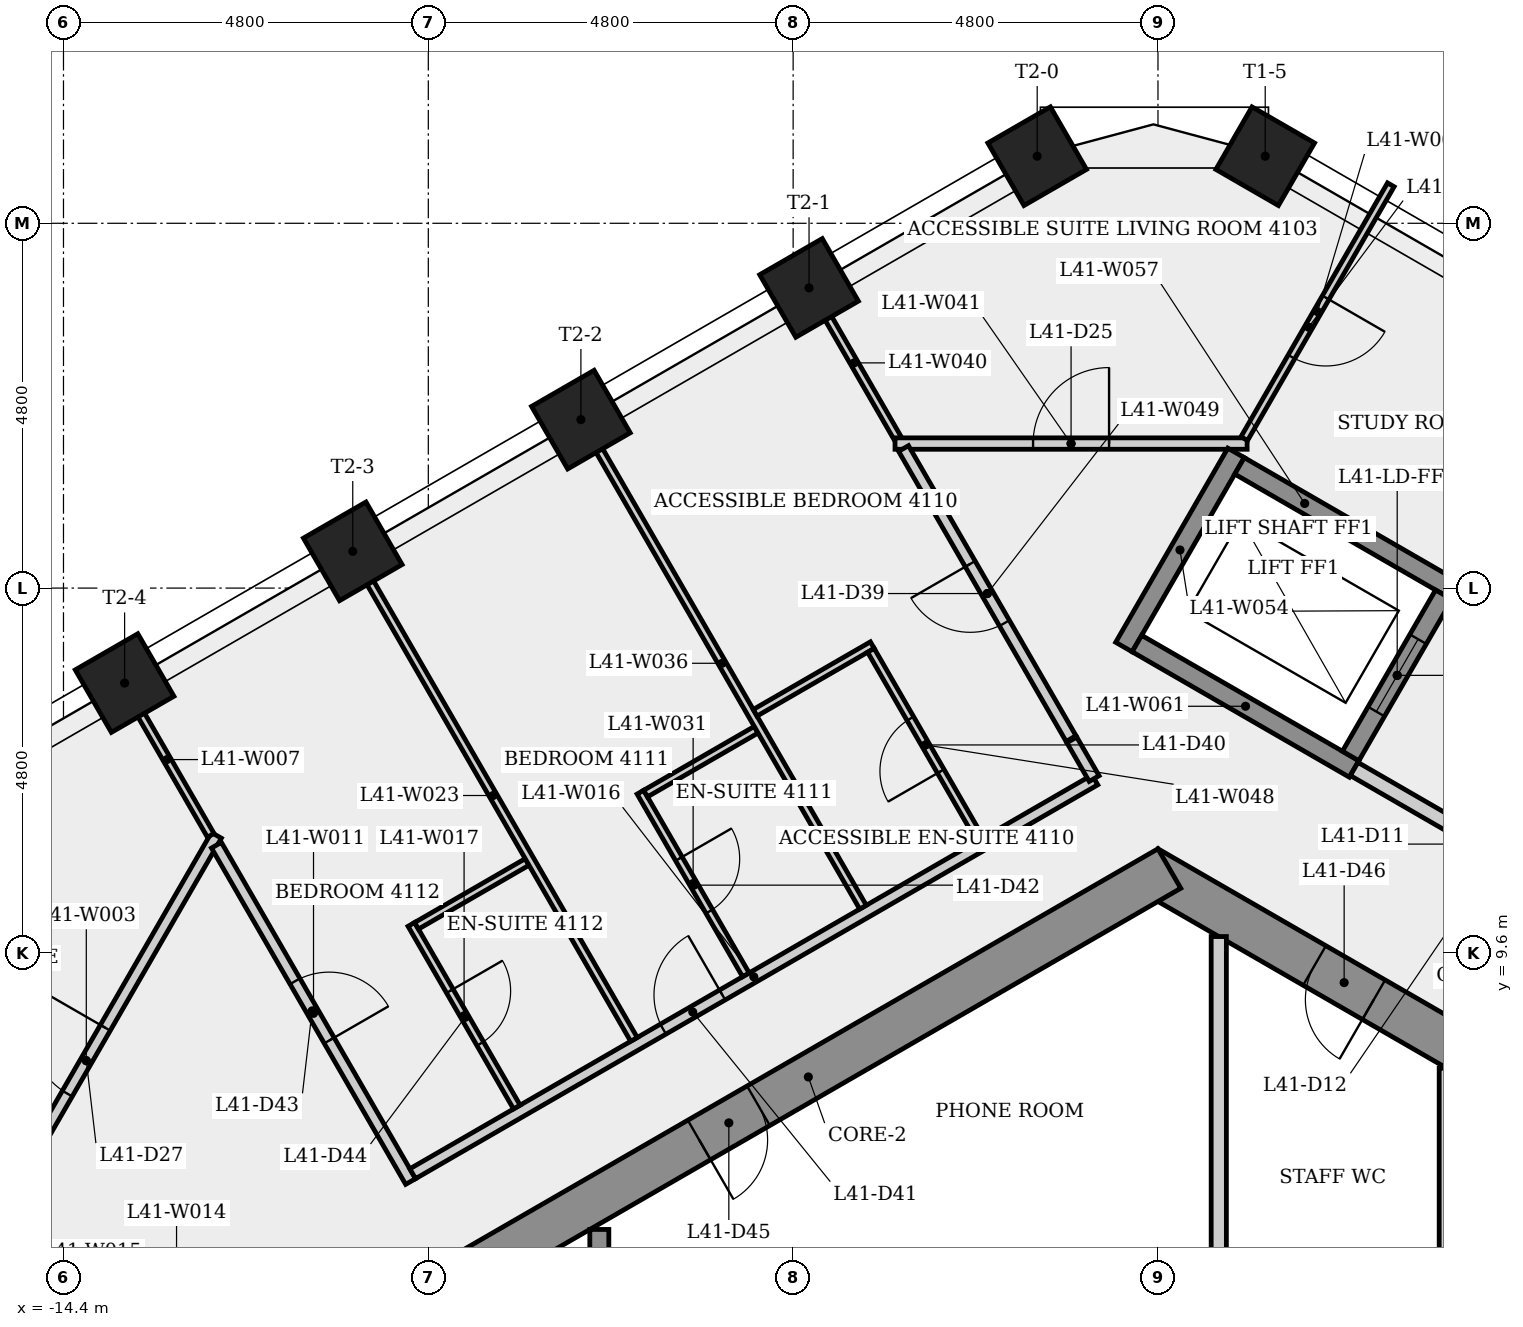
"""IFC4 building model, lengths in metres.
Left out: names, types, materials, properties, quantities, classifications, styles, units other than length and angle.
Written with IfcOpenShell. Run it as: python <this file> out.ifc"""

import sys

from ifc_helpers import new_model, si_unit, direction, frame, frame_2d, origin, origin_2d, place, context, subcontext, project, spatial, rectangle, extrude, element, fill, save


model = new_model("IFC4")
c1 = context("Model", 3, precision=1e-05, world=origin(), true_north=direction((0.0, 1.0)))
c2 = subcontext(c1, "Body", "Model", "MODEL_VIEW")
j1 = project(units=[si_unit("LENGTHUNIT", "METRE"), si_unit("PLANEANGLEUNIT", "RADIAN")], contexts=[c1])
p1 = place(None, origin())
s1 = spatial("IfcSite", under=j1, at=p1, CompositionType="ELEMENT")
p2 = place(p1, origin())
s2 = spatial("IfcBuilding", under=s1, at=p2, CompositionType="ELEMENT")
p3 = place(p2, frame((0.0, 0.0, 156.1)))
s3 = spatial("IfcBuildingStorey", under=s2, at=p3, CompositionType="ELEMENT", Elevation=156.1)
p4 = place(p3, frame((9.35, 5.225, 0.0), z_axis=(0.0, 0.0, 1.0), x_axis=(-0.866023993627, 0.500002442456, 0.0)))
e1 = element("IfcWall", 1, at=p4, inside=s3, PredefinedType="SHEAR", context=c2, shape_type="SweptSolid", body=[
    extrude(rectangle(XDim=10.97, YDim=0.6, at=frame_2d((5.485, 0.0))), origin(), (0.0, 0.0, 1.0), 3.4),
])
p5 = place(p4, frame((7.518, 0.0, 0.0)))
e2 = element("IfcOpeningElement", 2, at=p5, cuts=e1, PredefinedType="OPENING", context=c2, shape_type="SweptSolid", body=[
    extrude(rectangle(XDim=0.9, YDim=2.1, at=frame_2d((0.45, 1.05))), frame((0.0, 0.31, 0.0), z_axis=(0.0, -1.0, 0.0), x_axis=(1.0, 0.0, 0.0)), (0.0, 0.0, 1.0), 0.62),
])
p6 = place(p4, frame((1.172, 0.0, 0.0)))
e3 = element("IfcOpeningElement", 3, at=p6, cuts=e1, PredefinedType="OPENING", context=c2, shape_type="SweptSolid", body=[
    extrude(rectangle(XDim=0.9, YDim=2.1, at=frame_2d((0.45, 1.05))), frame((0.0, 0.31, 0.0), z_axis=(0.0, -1.0, 0.0), x_axis=(1.0, 0.0, 0.0)), (0.0, 0.0, 1.0), 0.62),
])
p7 = place(p3, frame((0.15, 10.71, 0.0), z_axis=(0.0, 0.0, 1.0), x_axis=(-0.866023993627, -0.500002442456, 0.0)))
e4 = element("IfcWall", 4, at=p7, inside=s3, PredefinedType="SHEAR", context=c2, shape_type="SweptSolid", body=[
    extrude(rectangle(XDim=10.97, YDim=0.6, at=frame_2d((5.485, 0.0))), origin(), (0.0, 0.0, 1.0), 3.4),
])
p8 = place(p7, frame((6.243, 0.0, 0.0)))
e5 = element("IfcOpeningElement", 5, at=p8, cuts=e4, PredefinedType="OPENING", context=c2, shape_type="SweptSolid", body=[
    extrude(rectangle(XDim=0.9, YDim=2.1, at=frame_2d((0.45, 1.05))), frame((0.0, 0.31, 0.0), z_axis=(0.0, -1.0, 0.0), x_axis=(1.0, 0.0, 0.0)), (0.0, 0.0, 1.0), 0.62),
])
for number, where, z_axis, x_axis in (
    (6, (1.411, 20.083, 0.0), (0.0, 0.0, 1.0), (0.5, 0.866, 0.0)),
    (7, (-1.589, 20.083, 0.0), (0.0, 0.0, 1.0), (-0.5, 0.866, 0.0)),
    (8, (-4.591, 18.35, 0.0), (0.0, 0.0, 1.0), (-0.5, 0.866, 0.0)),
    (9, (-7.593, 16.616, 0.0), (0.0, 0.0, 1.0), (-0.5, 0.866, 0.0)),
    (10, (-10.594, 14.884, 0.0), (0.0, 0.0, 1.0), (-0.5, 0.866, 0.0)),
    (11, (-13.596, 13.15, 0.0), (0.0, 0.0, 1.0), (-0.5, 0.866, 0.0)),
):
    element("IfcColumn", number, at=place(p3, frame(where, z_axis=z_axis, x_axis=x_axis)), inside=s3, PredefinedType="COLUMN", context=c2, shape_type="SweptSolid", body=[
        extrude(rectangle(XDim=0.95, YDim=0.95, at=origin_2d()), origin(), (0.0, 0.0, 1.0), 3.4),
    ])
p9 = place(p3, frame((-15.812, 5.216, 0.0), z_axis=(0.0, 0.0, 1.0), x_axis=(0.50000019414, 0.866025291697, 0.0)))
e12 = element("IfcWall", 12, at=p9, inside=s3, PredefinedType="PARTITIONING", context=c2, shape_type="SweptSolid", body=[
    extrude(rectangle(XDim=6.848, YDim=0.15, at=frame_2d((3.424, 0.0))), origin(), (0.0, 0.0, 1.0), 3.05),
])
p10 = place(p9, frame((2.924, 0.0, 0.0)))
e13 = element("IfcOpeningElement", 13, at=p10, cuts=e12, PredefinedType="OPENING", context=c2, shape_type="SweptSolid", body=[
    extrude(rectangle(XDim=1.0, YDim=2.1, at=frame_2d((0.5, 1.05))), frame((0.0, 0.085, 0.0), z_axis=(0.0, -1.0, 0.0), x_axis=(1.0, 0.0, 0.0)), (0.0, 0.0, 1.0), 0.17),
])
p11 = place(p3, frame((-13.614, 13.14, 0.0), z_axis=(0.0, 0.0, 1.0), x_axis=(0.49996120575, -0.866047800497, 0.0)))
e14 = element("IfcWall", 14, at=p11, inside=s3, PredefinedType="PARTITIONING", context=c2, shape_type="SweptSolid", body=[
    extrude(rectangle(XDim=2.302, YDim=0.1, at=frame_2d((1.151, 0.0))), origin(), (0.0, 0.0, 1.0), 3.05),
])
p12 = place(p3, frame((-12.388, 11.017, 0.0), z_axis=(0.0, 0.0, 1.0), x_axis=(0.499962338254, -0.866047146712, 0.0)))
e15 = element("IfcWall", 15, at=p12, inside=s3, PredefinedType="PARTITIONING", context=c2, shape_type="SweptSolid", body=[
    extrude(rectangle(XDim=5.11, YDim=0.15, at=frame_2d((2.555, 0.0))), origin(), (0.0, 0.0, 1.0), 3.05),
])
p13 = place(p12, frame((2.067, 0.0, 0.0)))
e16 = element("IfcOpeningElement", 16, at=p13, cuts=e15, PredefinedType="OPENING", context=c2, shape_type="SweptSolid", body=[
    extrude(rectangle(XDim=0.9, YDim=2.1, at=frame_2d((0.45, 1.05))), frame((0.0, 0.085, 0.0), z_axis=(0.0, -1.0, 0.0), x_axis=(1.0, 0.0, 0.0)), (0.0, 0.0, 1.0), 0.17),
])
p14 = place(p3, frame((-9.805, 6.694, 0.0), z_axis=(0.0, 0.0, 1.0), x_axis=(0.866028286753, 0.499995006518, 0.0)))
e17 = element("IfcWall", 17, at=p14, inside=s3, PredefinedType="PARTITIONING", context=c2, shape_type="SweptSolid", body=[
    extrude(rectangle(XDim=10.364, YDim=0.15, at=frame_2d((5.182, 0.0))), origin(), (0.0, 0.0, 1.0), 3.05),
])
p15 = place(p14, frame((3.805, 0.0, 0.0)))
e18 = element("IfcOpeningElement", 18, at=p15, cuts=e17, PredefinedType="OPENING", context=c2, shape_type="SweptSolid", body=[
    extrude(rectangle(XDim=0.9, YDim=2.1, at=frame_2d((0.45, 1.05))), frame((0.0, 0.085, 0.0), z_axis=(0.0, -1.0, 0.0), x_axis=(1.0, 0.0, 0.0)), (0.0, 0.0, 1.0), 0.17),
])
p16 = place(p3, frame((-9.823, 9.975, 0.0), z_axis=(0.0, 0.0, 1.0), x_axis=(0.499971228071, -0.866042014628, 0.0)))
e19 = element("IfcWall", 19, at=p16, inside=s3, PredefinedType="PARTITIONING", context=c2, shape_type="SweptSolid", body=[
    extrude(rectangle(XDim=2.775, YDim=0.1, at=frame_2d((1.388, 0.0))), origin(), (0.0, 0.0, 1.0), 3.05),
])
p17 = place(p16, frame((1.012, 0.0, 0.0)))
e20 = element("IfcOpeningElement", 20, at=p17, cuts=e19, PredefinedType="OPENING", context=c2, shape_type="SweptSolid", body=[
    extrude(rectangle(XDim=0.8, YDim=2.1, at=frame_2d((0.4, 1.05))), frame((0.0, 0.06, 0.0), z_axis=(0.0, -1.0, 0.0), x_axis=(1.0, 0.0, 0.0)), (0.0, 0.0, 1.0), 0.12),
])
p18 = place(p3, frame((-8.3, 10.796, 0.0), z_axis=(0.0, 0.0, 1.0), x_axis=(-0.866052479261, -0.499953100966, 0.0)))
e21 = element("IfcWall", 21, at=p18, inside=s3, PredefinedType="PARTITIONING", context=c2, shape_type="SweptSolid", body=[
    extrude(rectangle(XDim=1.68, YDim=0.1, at=frame_2d((0.84, 0.0))), origin(), (0.0, 0.0, 1.0), 3.05),
])
p19 = place(p3, frame((-10.6, 14.88, 0.0), z_axis=(0.0, 0.0, 1.0), x_axis=(0.499997136009, -0.866027057304, 0.0)))
e22 = element("IfcWall", 22, at=p19, inside=s3, PredefinedType="PARTITIONING", context=c2, shape_type="SweptSolid", body=[
    extrude(rectangle(XDim=7.412, YDim=0.1, at=frame_2d((3.706, 0.0))), origin(), (0.0, 0.0, 1.0), 3.05),
])
p20 = place(p3, frame((-7.35, 1.925, 0.0), z_axis=(0.0, 0.0, 1.0), x_axis=(0.0, 1.0, 0.0)))
e23 = element("IfcWall", 23, at=p20, inside=s3, PredefinedType="SHEAR", context=c2, shape_type="SweptSolid", body=[
    extrude(rectangle(XDim=4.036, YDim=0.25, at=frame_2d((2.018, 0.0))), origin(), (0.0, 0.0, 1.0), 3.05),
])
p21 = place(p3, frame((-6.81, 11.715, 0.0), z_axis=(0.0, 0.0, 1.0), x_axis=(0.50000932403, -0.866020020486, 0.0)))
e24 = element("IfcWall", 24, at=p21, inside=s3, PredefinedType="PARTITIONING", context=c2, shape_type="SweptSolid", body=[
    extrude(rectangle(XDim=2.775, YDim=0.1, at=frame_2d((1.387, 0.0))), origin(), (0.0, 0.0, 1.0), 3.05),
])
p22 = place(p21, frame((1.012, 0.0, 0.0)))
e25 = element("IfcOpeningElement", 25, at=p22, cuts=e24, PredefinedType="OPENING", context=c2, shape_type="SweptSolid", body=[
    extrude(rectangle(XDim=0.8, YDim=2.1, at=frame_2d((0.4, 1.05))), frame((0.0, 0.06, 0.0), z_axis=(0.0, -1.0, 0.0), x_axis=(1.0, 0.0, 0.0)), (0.0, 0.0, 1.0), 0.12),
])
p23 = place(p3, frame((-5.287, 12.536, 0.0), z_axis=(0.0, 0.0, 1.0), x_axis=(-0.865953201874, -0.50012503653, 0.0)))
e26 = element("IfcWall", 26, at=p23, inside=s3, PredefinedType="PARTITIONING", context=c2, shape_type="SweptSolid", body=[
    extrude(rectangle(XDim=1.68, YDim=0.1, at=frame_2d((0.84, 0.0))), origin(), (0.0, 0.0, 1.0), 3.05),
])
p24 = place(p3, frame((-7.586, 16.62, 0.0), z_axis=(0.0, 0.0, 1.0), x_axis=(0.500011399757, -0.866018822032, 0.0)))
e27 = element("IfcWall", 27, at=p24, inside=s3, PredefinedType="PARTITIONING", context=c2, shape_type="SweptSolid", body=[
    extrude(rectangle(XDim=7.411, YDim=0.1, at=frame_2d((3.706, 0.0))), origin(), (0.0, 0.0, 1.0), 3.05),
])
p25 = place(p3, frame((-3.759, 13.649, 0.0), z_axis=(0.0, 0.0, 1.0), x_axis=(-0.866014251095, -0.500019316528, 0.0)))
e28 = element("IfcWall", 28, at=p25, inside=s3, PredefinedType="PARTITIONING", context=c2, shape_type="SweptSolid", body=[
    extrude(rectangle(XDim=1.78, YDim=0.1, at=frame_2d((0.89, 0.0))), origin(), (0.0, 0.0, 1.0), 3.05),
])
p26 = place(p3, frame((-3.422, 16.367, 0.0), z_axis=(0.0, 0.0, 1.0), x_axis=(-0.500040764516, 0.866001867101, 0.0)))
e29 = element("IfcWall", 29, at=p26, inside=s3, PredefinedType="PARTITIONING", context=c2, shape_type="SweptSolid", body=[
    extrude(rectangle(XDim=2.302, YDim=0.1, at=frame_2d((1.151, 0.0))), origin(), (0.0, 0.0, 1.0), 3.05),
])
p27 = place(p3, frame((-3.46, 16.302, 0.0), z_axis=(0.0, 0.0, 1.0), x_axis=(1.0, 0.0, 0.0)))
e30 = element("IfcWall", 30, at=p27, inside=s3, PredefinedType="PARTITIONING", context=c2, shape_type="SweptSolid", body=[
    extrude(rectangle(XDim=4.633, YDim=0.15, at=frame_2d((2.316, 0.0))), origin(), (0.0, 0.0, 1.0), 3.05),
])
p28 = place(p27, frame((1.816, 0.0, 0.0)))
e31 = element("IfcOpeningElement", 31, at=p28, cuts=e30, PredefinedType="OPENING", context=c2, shape_type="SweptSolid", body=[
    extrude(rectangle(XDim=1.0, YDim=2.1, at=frame_2d((0.5, 1.05))), frame((0.0, 0.085, 0.0), z_axis=(0.0, -1.0, 0.0), x_axis=(1.0, 0.0, 0.0)), (0.0, 0.0, 1.0), 0.17),
])
p29 = place(p3, frame((-2.339, 11.091, 0.0), z_axis=(0.0, 0.0, 1.0), x_axis=(-0.500011588718, 0.866018712932, 0.0)))
e32 = element("IfcWall", 32, at=p29, inside=s3, PredefinedType="PARTITIONING", context=c2, shape_type="SweptSolid", body=[
    extrude(rectangle(XDim=2.875, YDim=0.1, at=frame_2d((1.438, 0.0))), origin(), (0.0, 0.0, 1.0), 3.05),
])
p30 = place(p29, frame((1.038, 0.0, 0.0)))
e33 = element("IfcOpeningElement", 33, at=p30, cuts=e32, PredefinedType="OPENING", context=c2, shape_type="SweptSolid", body=[
    extrude(rectangle(XDim=0.8, YDim=2.1, at=frame_2d((0.4, 1.05))), frame((0.0, 0.06, 0.0), z_axis=(0.0, -1.0, 0.0), x_axis=(1.0, 0.0, 0.0)), (0.0, 0.0, 1.0), 0.12),
])
p31 = place(p3, frame((-1.143, 12.42, 0.0), z_axis=(0.0, 0.0, 1.0), x_axis=(-0.500005339912, 0.866022320763, 0.0)))
e34 = element("IfcWall", 34, at=p31, inside=s3, PredefinedType="PARTITIONING", context=c2, shape_type="SweptSolid", body=[
    extrude(rectangle(XDim=4.408, YDim=0.15, at=frame_2d((2.204, 0.0))), origin(), (0.0, 0.0, 1.0), 3.05),
])
p32 = place(p31, frame((1.754, 0.0, 0.0)))
e35 = element("IfcOpeningElement", 35, at=p32, cuts=e34, PredefinedType="OPENING", context=c2, shape_type="SweptSolid", body=[
    extrude(rectangle(XDim=0.9, YDim=2.1, at=frame_2d((0.45, 1.05))), frame((0.0, 0.085, 0.0), z_axis=(0.0, -1.0, 0.0), x_axis=(1.0, 0.0, 0.0)), (0.0, 0.0, 1.0), 0.17),
])
p33 = place(p3, frame((-1.133, 12.402, 0.0), z_axis=(0.0, 0.0, 1.0), x_axis=(0.499938297808, -0.866061024631, 0.0)))
e36 = element("IfcWall", 36, at=p33, inside=s3, PredefinedType="PARTITIONING", context=c2, shape_type="SweptSolid", body=[
    extrude(rectangle(XDim=0.587, YDim=0.15, at=frame_2d((0.294, 0.0))), origin(), (0.0, 0.0, 1.0), 3.05),
])
p34 = place(p3, frame((-0.448, 13.624, 0.0), z_axis=(0.0, 0.0, 1.0), x_axis=(0.500037662692, 0.866003658127, 0.0)))
e37 = element("IfcWall", 37, at=p34, inside=s3, PredefinedType="SHEAR", context=c2, shape_type="SweptSolid", body=[
    extrude(rectangle(XDim=2.95, YDim=0.25, at=frame_2d((1.475, 0.0))), origin(), (0.0, 0.0, 1.0), 3.05),
])
p35 = place(p3, frame((0.8, 9.815, 0.0), z_axis=(0.0, 0.0, 1.0), x_axis=(0.0, -1.0, 0.0)))
e38 = element("IfcWall", 38, at=p35, inside=s3, PredefinedType="PARTITIONING", context=c2, shape_type="SweptSolid", body=[
    extrude(rectangle(XDim=4.54, YDim=0.2, at=frame_2d((2.27, 0.0))), origin(), (0.0, 0.0, 1.0), 3.05),
])
for number, where, z_axis, x_axis in (
    (39, (1.073, 16.008, 0.0), (0.0, 0.0, 1.0), (0.866, -0.5, 0.0)),
    (40, (2.581, 12.02, 0.0), (0.0, 0.0, 1.0), (-0.866, 0.5, 0.0)),
):
    element("IfcWall", number, at=place(p3, frame(where, z_axis=z_axis, x_axis=x_axis)), inside=s3, PredefinedType="SHEAR", context=c2, shape_type="SweptSolid", body=[
        extrude(rectangle(XDim=3.3, YDim=0.25, at=frame_2d((1.65, 0.0))), origin(), (0.0, 0.0, 1.0), 3.05),
    ])
p36 = place(p3, frame((2.535, 12.191, 0.0), z_axis=(0.0, 0.0, 1.0), x_axis=(0.500061746146, 0.865989751695, 0.0)))
e41 = element("IfcWall", 41, at=p36, inside=s3, PredefinedType="SHEAR", context=c2, shape_type="SweptSolid", body=[
    extrude(rectangle(XDim=2.45, YDim=0.25, at=frame_2d((1.225, 0.0))), origin(), (0.0, 0.0, 1.0), 3.4),
])
p37 = place(p36, frame((0.675, 0.0, 0.0)))
e42 = element("IfcOpeningElement", 42, at=p37, cuts=e41, PredefinedType="OPENING", context=c2, shape_type="SweptSolid", body=[
    extrude(rectangle(XDim=1.1, YDim=2.1, at=frame_2d((0.55, 1.05))), frame((0.0, 0.135, 0.0), z_axis=(0.0, -1.0, 0.0), x_axis=(1.0, 0.0, 0.0)), (0.0, 0.0, 1.0), 0.27),
])
p38 = place(p3, frame((3.064, 19.707, 0.0), z_axis=(0.0, 0.0, 1.0), x_axis=(-0.499992798144, -0.866029561738, 0.0)))
e43 = element("IfcWall", 43, at=p38, inside=s3, PredefinedType="PARTITIONING", context=c2, shape_type="SweptSolid", body=[
    extrude(rectangle(XDim=3.856, YDim=0.1, at=frame_2d((1.928, 0.0))), origin(), (0.0, 0.0, 1.0), 3.05),
])
p39 = place(p38, frame((1.714, 0.0, 0.0)))
e44 = element("IfcOpeningElement", 44, at=p39, cuts=e43, PredefinedType="OPENING", context=c2, shape_type="SweptSolid", body=[
    extrude(rectangle(XDim=0.9, YDim=2.1, at=frame_2d((0.45, 1.05))), frame((0.0, 0.06, 0.0), z_axis=(0.0, -1.0, 0.0), x_axis=(1.0, 0.0, 0.0)), (0.0, 0.0, 1.0), 0.12),
])
p40 = place(p3, frame((3.8, 8.083, 0.0), z_axis=(0.0, 0.0, 1.0), x_axis=(0.0, -1.0, 0.0)))
e45 = element("IfcWall", 45, at=p40, inside=s3, PredefinedType="PARTITIONING", context=c2, shape_type="SweptSolid", body=[
    extrude(rectangle(XDim=2.808, YDim=0.2, at=frame_2d((1.404, 0.0))), origin(), (0.0, 0.0, 1.0), 3.05),
])
p41 = place(p3, frame((6.435, 9.795, 0.0), z_axis=(0.0, 0.0, 1.0), x_axis=(-0.866012907634, 0.500021643343, 0.0)))
e46 = element("IfcWall", 46, at=p41, inside=s3, PredefinedType="PARTITIONING", context=c2, shape_type="SweptSolid", body=[
    extrude(rectangle(XDim=4.45, YDim=0.2, at=frame_2d((2.225, 0.0))), origin(), (0.0, 0.0, 1.0), 3.05),
])
p42 = place(p41, frame((1.675, 0.0, 0.0)))
e47 = element("IfcOpeningElement", 47, at=p42, cuts=e46, PredefinedType="OPENING", context=c2, shape_type="SweptSolid", body=[
    extrude(rectangle(XDim=1.1, YDim=2.1, at=frame_2d((0.55, 1.05))), frame((0.0, 0.11, 0.0), z_axis=(0.0, -1.0, 0.0), x_axis=(1.0, 0.0, 0.0)), (0.0, 0.0, 1.0), 0.22),
])
p43 = place(p37, origin())
e48 = element("IfcDoor", 48, at=p43, inside=s3, OperationType="SLIDING_TO_LEFT", PredefinedType="DOOR", context=c2, shape_type="SweptSolid", body=[
    extrude(rectangle(XDim=1.1, YDim=2.1, at=frame_2d((0.55, 1.05))), frame((0.0, 0.025, 0.0), z_axis=(0.0, -1.0, 0.0), x_axis=(1.0, 0.0, 0.0)), (0.0, 0.0, 1.0), 0.05),
])
fill(e42, e48)
p44 = place(p28, origin())
e49 = element("IfcDoor", 49, at=p44, inside=s3, OperationType="SINGLE_SWING_RIGHT", PredefinedType="DOOR", context=c2, shape_type="SweptSolid", body=[
    extrude(rectangle(XDim=1.0, YDim=2.1, at=frame_2d((0.5, 1.05))), frame((0.0, 0.025, 0.0), z_axis=(0.0, -1.0, 0.0), x_axis=(1.0, 0.0, 0.0)), (0.0, 0.0, 1.0), 0.05),
])
fill(e31, e49)
p45 = place(p39, origin())
e50 = element("IfcDoor", 50, at=p45, inside=s3, OperationType="SINGLE_SWING_LEFT", PredefinedType="DOOR", context=c2, shape_type="SweptSolid", body=[
    extrude(rectangle(XDim=0.9, YDim=2.1, at=frame_2d((0.45, 1.05))), frame((0.0, 0.025, 0.0), z_axis=(0.0, -1.0, 0.0), x_axis=(1.0, 0.0, 0.0)), (0.0, 0.0, 1.0), 0.05),
])
fill(e44, e50)
p46 = place(p10, origin())
e51 = element("IfcDoor", 51, at=p46, inside=s3, OperationType="SINGLE_SWING_RIGHT", PredefinedType="DOOR", context=c2, shape_type="SweptSolid", body=[
    extrude(rectangle(XDim=1.0, YDim=2.1, at=frame_2d((0.5, 1.05))), frame((0.0, 0.025, 0.0), z_axis=(0.0, -1.0, 0.0), x_axis=(1.0, 0.0, 0.0)), (0.0, 0.0, 1.0), 0.05),
])
fill(e13, e51)
p47 = place(p32, origin())
e52 = element("IfcDoor", 52, at=p47, inside=s3, OperationType="SINGLE_SWING_RIGHT", PredefinedType="DOOR", context=c2, shape_type="SweptSolid", body=[
    extrude(rectangle(XDim=0.9, YDim=2.1, at=frame_2d((0.45, 1.05))), frame((0.0, 0.025, 0.0), z_axis=(0.0, -1.0, 0.0), x_axis=(1.0, 0.0, 0.0)), (0.0, 0.0, 1.0), 0.05),
])
fill(e35, e52)
p48 = place(p30, origin())
e53 = element("IfcDoor", 53, at=p48, inside=s3, OperationType="SINGLE_SWING_LEFT", PredefinedType="DOOR", context=c2, shape_type="SweptSolid", body=[
    extrude(rectangle(XDim=0.8, YDim=2.1, at=frame_2d((0.4, 1.05))), frame((0.0, 0.025, 0.0), z_axis=(0.0, -1.0, 0.0), x_axis=(1.0, 0.0, 0.0)), (0.0, 0.0, 1.0), 0.05),
])
fill(e33, e53)
p49 = place(p15, origin())
e54 = element("IfcDoor", 54, at=p49, inside=s3, OperationType="SINGLE_SWING_RIGHT", PredefinedType="DOOR", context=c2, shape_type="SweptSolid", body=[
    extrude(rectangle(XDim=0.9, YDim=2.1, at=frame_2d((0.45, 1.05))), frame((0.0, 0.025, 0.0), z_axis=(0.0, -1.0, 0.0), x_axis=(1.0, 0.0, 0.0)), (0.0, 0.0, 1.0), 0.05),
])
fill(e18, e54)
p50 = place(p22, origin())
e55 = element("IfcDoor", 55, at=p50, inside=s3, OperationType="SINGLE_SWING_LEFT", PredefinedType="DOOR", context=c2, shape_type="SweptSolid", body=[
    extrude(rectangle(XDim=0.8, YDim=2.1, at=frame_2d((0.4, 1.05))), frame((0.0, 0.025, 0.0), z_axis=(0.0, -1.0, 0.0), x_axis=(1.0, 0.0, 0.0)), (0.0, 0.0, 1.0), 0.05),
])
fill(e25, e55)
p51 = place(p13, origin())
e56 = element("IfcDoor", 56, at=p51, inside=s3, OperationType="SINGLE_SWING_RIGHT", PredefinedType="DOOR", context=c2, shape_type="SweptSolid", body=[
    extrude(rectangle(XDim=0.9, YDim=2.1, at=frame_2d((0.45, 1.05))), frame((0.0, 0.025, 0.0), z_axis=(0.0, -1.0, 0.0), x_axis=(1.0, 0.0, 0.0)), (0.0, 0.0, 1.0), 0.05),
])
fill(e16, e56)
p52 = place(p17, origin())
e57 = element("IfcDoor", 57, at=p52, inside=s3, OperationType="SINGLE_SWING_LEFT", PredefinedType="DOOR", context=c2, shape_type="SweptSolid", body=[
    extrude(rectangle(XDim=0.8, YDim=2.1, at=frame_2d((0.4, 1.05))), frame((0.0, 0.025, 0.0), z_axis=(0.0, -1.0, 0.0), x_axis=(1.0, 0.0, 0.0)), (0.0, 0.0, 1.0), 0.05),
])
fill(e20, e57)
p53 = place(p8, origin())
e58 = element("IfcDoor", 58, at=p53, inside=s3, OperationType="SINGLE_SWING_RIGHT", PredefinedType="DOOR", context=c2, shape_type="SweptSolid", body=[
    extrude(rectangle(XDim=0.9, YDim=2.1, at=frame_2d((0.45, 1.05))), frame((0.0, 0.025, 0.0), z_axis=(0.0, -1.0, 0.0), x_axis=(1.0, 0.0, 0.0)), (0.0, 0.0, 1.0), 0.05),
])
fill(e5, e58)
p54 = place(p5, origin())
e59 = element("IfcDoor", 59, at=p54, inside=s3, OperationType="SINGLE_SWING_LEFT", PredefinedType="DOOR", context=c2, shape_type="SweptSolid", body=[
    extrude(rectangle(XDim=0.9, YDim=2.1, at=frame_2d((0.45, 1.05))), frame((0.0, 0.025, 0.0), z_axis=(0.0, -1.0, 0.0), x_axis=(1.0, 0.0, 0.0)), (0.0, 0.0, 1.0), 0.05),
])
fill(e2, e59)
save(model, sys.argv[1])
